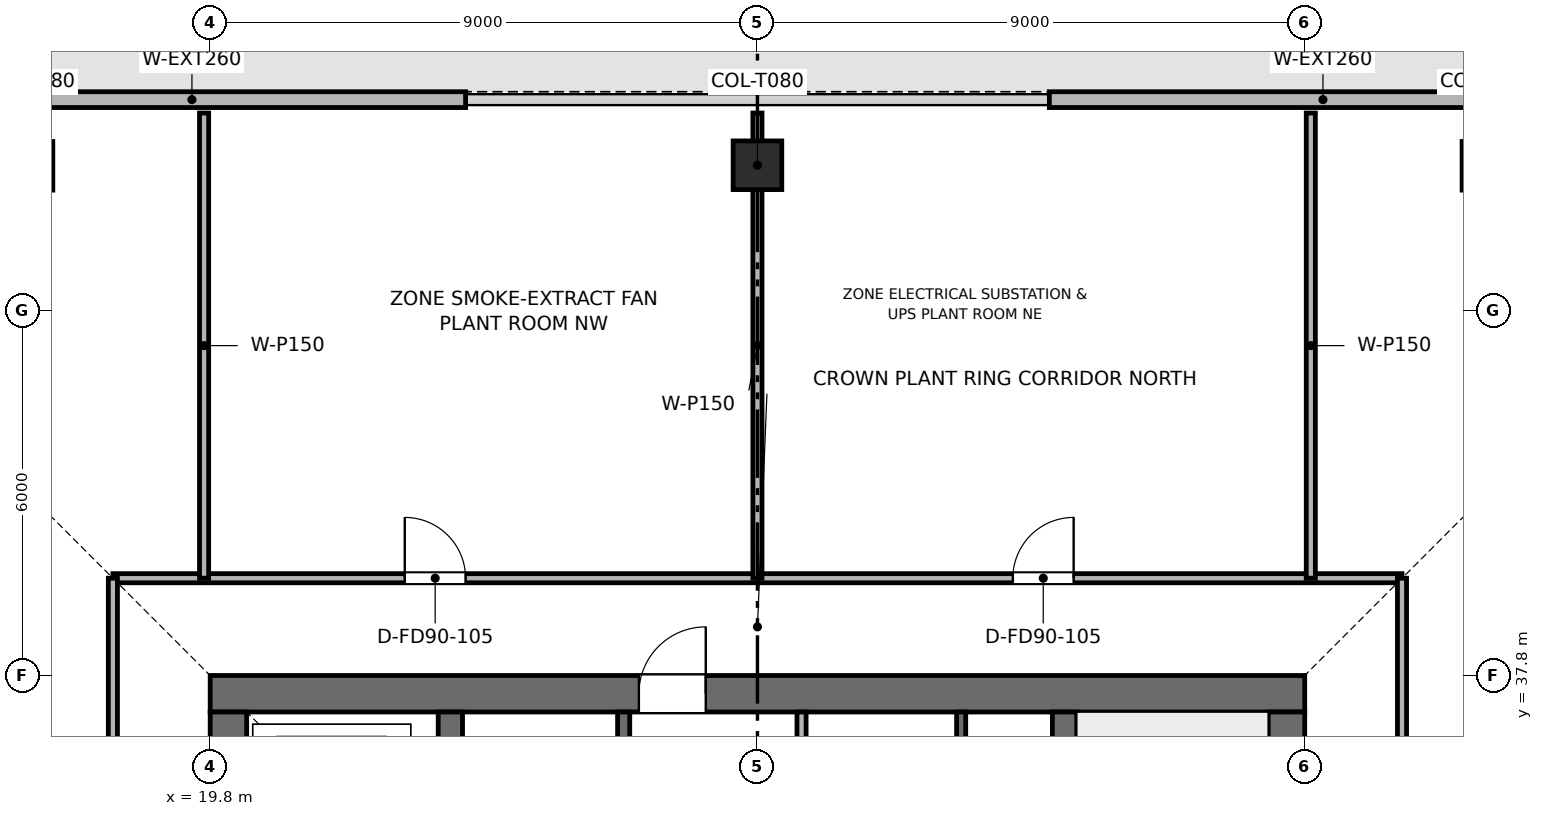
"""IFC4 building model, lengths in metres.
Left out: names, types, materials, properties, quantities, classifications, styles, units other than length and angle.
Written with IfcOpenShell. Run it as: python <this file> out.ifc"""

import sys

from ifc_helpers import new_model, si_unit, direction, frame, frame_2d, origin, origin_2d, place, context, subcontext, project, spatial, rectangle, extrude, element, fill, save


model = new_model("IFC4")
c1 = context("Model", 3, precision=1e-05, world=origin(), true_north=direction((0.0, 1.0)))
c2 = subcontext(c1, "Body", "Model", "MODEL_VIEW")
j1 = project(units=[si_unit("LENGTHUNIT", "METRE"), si_unit("PLANEANGLEUNIT", "RADIAN")], contexts=[c1])
p1 = place(None, origin())
s1 = spatial("IfcSite", under=j1, at=p1, CompositionType="ELEMENT")
p2 = place(p1, origin())
s2 = spatial("IfcBuilding", under=s1, at=p2, CompositionType="ELEMENT")
p3 = place(p2, frame((0.0, 0.0, 369.0)))
s3 = spatial("IfcBuildingStorey", under=s2, at=p3, CompositionType="ELEMENT", Elevation=369.0)
p4 = place(p3, frame((19.8, 37.5, 0.0), z_axis=(0.0, 0.0, 1.0), x_axis=(1.0, 0.0, 0.0)))
e1 = element("IfcWall", 1, at=p4, inside=s3, PredefinedType="SHEAR", context=c2, shape_type="SweptSolid", body=[
    extrude(rectangle(XDim=18.0, YDim=0.6, at=frame_2d((9.0, 0.0))), origin(), (0.0, 0.0, 1.0), 4.8),
])
p5 = place(p4, frame((7.05, 0.0, 0.0)))
e2 = element("IfcOpeningElement", 2, at=p5, cuts=e1, PredefinedType="OPENING", context=c2, shape_type="SweptSolid", body=[
    extrude(rectangle(XDim=1.1, YDim=2.15, at=frame_2d((0.55, 1.075))), frame((0.0, 0.31, 0.0), z_axis=(0.0, -1.0, 0.0), x_axis=(1.0, 0.0, 0.0)), (0.0, 0.0, 1.0), 0.62),
])
p6 = place(p3, frame((20.1, 20.4, 0.0), z_axis=(0.0, 0.0, 1.0), x_axis=(0.0, 1.0, 0.0)))
e3 = element("IfcWall", 3, at=p6, inside=s3, PredefinedType="SHEAR", context=c2, shape_type="SweptSolid", body=[
    extrude(rectangle(XDim=16.8, YDim=0.6, at=frame_2d((8.4, 0.0))), origin(), (0.0, 0.0, 1.0), 4.8),
])
p7 = place(p6, frame((10.4, 0.0, 0.0)))
e4 = element("IfcOpeningElement", 4, at=p7, cuts=e3, PredefinedType="OPENING", context=c2, shape_type="SweptSolid", body=[
    extrude(rectangle(XDim=1.1, YDim=2.15, at=frame_2d((0.55, 1.075))), frame((0.0, 0.31, 0.0), z_axis=(0.0, -1.0, 0.0), x_axis=(1.0, 0.0, 0.0)), (0.0, 0.0, 1.0), 0.62),
])
p8 = place(p3, frame((37.5, 20.4, 0.0), z_axis=(0.0, 0.0, 1.0), x_axis=(0.0, 1.0, 0.0)))
e5 = element("IfcWall", 5, at=p8, inside=s3, PredefinedType="SHEAR", context=c2, shape_type="SweptSolid", body=[
    extrude(rectangle(XDim=16.8, YDim=0.6, at=frame_2d((8.4, 0.0))), origin(), (0.0, 0.0, 1.0), 4.8),
])
p9 = place(p8, frame((4.9, 0.0, 0.0)))
e6 = element("IfcOpeningElement", 6, at=p9, cuts=e5, PredefinedType="OPENING", context=c2, shape_type="SweptSolid", body=[
    extrude(rectangle(XDim=1.1, YDim=2.15, at=frame_2d((0.55, 1.075))), frame((0.0, 0.31, 0.0), z_axis=(0.0, -1.0, 0.0), x_axis=(1.0, 0.0, 0.0)), (0.0, 0.0, 1.0), 0.62),
])
for number, where, z_axis, x_axis in (
    (7, (23.75, 20.4, 0.0), (0.0, 0.0, 1.0), (0.0, 1.0, 0.0)),
    (8, (33.85, 20.4, 0.0), (0.0, 0.0, 1.0), (0.0, 1.0, 0.0)),
):
    element("IfcWall", number, at=place(p3, frame(where, z_axis=z_axis, x_axis=x_axis)), inside=s3, PredefinedType="SHEAR", context=c2, shape_type="SweptSolid", body=[
        extrude(rectangle(XDim=16.8, YDim=0.4, at=frame_2d((8.4, 0.0))), origin(), (0.0, 0.0, 1.0), 4.8),
    ])
p10 = place(p3, frame((40.788, 46.182, 0.049), z_axis=(-0.228000086826, -0.341924783218, 0.911648727871), x_axis=(0.831993877934, -0.554784811509, 0.0)))
e9 = element("IfcColumn", 9, at=p10, inside=s3, PredefinedType="COLUMN", context=c2, shape_type="SweptSolid", body=[
    extrude(rectangle(XDim=0.8, YDim=0.8, at=origin_2d()), origin(), (0.0, 0.0, 1.0), 4.86),
])
p11 = place(p3, frame((28.8, 46.191, 0.025), z_axis=(0.0, -0.35111223817, 0.936333378774), x_axis=(1.0, 0.0, 0.0)))
e10 = element("IfcColumn", 10, at=p11, inside=s3, PredefinedType="COLUMN", context=c2, shape_type="SweptSolid", body=[
    extrude(rectangle(XDim=0.8, YDim=0.8, at=origin_2d()), origin(), (0.0, 0.0, 1.0), 4.776),
])
p12 = place(p3, frame((16.812, 46.182, 0.049), z_axis=(0.227952465889, -0.341928698833, 0.911659167787), x_axis=(0.832050294338, 0.554700196225, 0.0)))
e11 = element("IfcColumn", 11, at=p12, inside=s3, PredefinedType="COLUMN", context=c2, shape_type="SweptSolid", body=[
    extrude(rectangle(XDim=0.8, YDim=0.8, at=origin_2d()), origin(), (0.0, 0.0, 1.0), 4.86),
])
for number, where, z_axis, x_axis in (
    (12, (41.246, 41.246, 0.018), (-0.236, -0.236, 0.943), (0.707, -0.707, 0.0)),
    (13, (16.354, 41.246, 0.018), (0.236, -0.236, 0.943), (0.707, 0.707, 0.0)),
):
    element("IfcColumn", number, at=place(p3, frame(where, z_axis=z_axis, x_axis=x_axis)), inside=s3, PredefinedType="COLUMN", context=c2, shape_type="SweptSolid", body=[
        extrude(rectangle(XDim=0.8, YDim=0.8, at=origin_2d()), origin(), (0.0, 0.0, 1.0), 4.751),
    ])
for number, where, z_axis, x_axis in (
    (14, (15.0, 47.27, 0.0), (0.0, 0.0, 1.0), (1.0, 0.0, 0.0)),
    (15, (33.6, 47.27, 0.0), (0.0, 0.0, 1.0), (1.0, 0.0, 0.0)),
):
    element("IfcWall", number, at=place(p3, frame(where, z_axis=z_axis, x_axis=x_axis)), inside=s3, PredefinedType="SOLIDWALL", context=c2, shape_type="SweptSolid", body=[
        extrude(rectangle(XDim=9.0, YDim=0.26, at=frame_2d((4.5, 0.0))), origin(), (0.0, 0.0, 1.0), 4.5),
    ])
p13 = place(p3, frame((32.15, 34.0, 0.0), z_axis=(0.0, 0.0, 1.0), x_axis=(0.0, 1.0, 0.0)))
e16 = element("IfcWall", 16, at=p13, inside=s3, PredefinedType="SHEAR", context=c2, shape_type="SweptSolid", body=[
    extrude(rectangle(XDim=3.2, YDim=0.15, at=frame_2d((1.6, 0.0))), origin(), (0.0, 0.0, 1.0), 4.5),
])
p14 = place(p3, frame((26.6, 34.0, 0.0), z_axis=(0.0, 0.0, 1.0), x_axis=(0.0, 1.0, 0.0)))
e17 = element("IfcWall", 17, at=p14, inside=s3, PredefinedType="SHEAR", context=c2, shape_type="SweptSolid", body=[
    extrude(rectangle(XDim=3.2, YDim=0.2, at=frame_2d((1.6, 0.0))), origin(), (0.0, 0.0, 1.0), 4.5),
])
p15 = place(p14, frame((0.75, 0.0, 0.0)))
e18 = element("IfcOpeningElement", 18, at=p15, cuts=e17, PredefinedType="OPENING", context=c2, shape_type="SweptSolid", body=[
    extrude(rectangle(XDim=1.1, YDim=2.15, at=frame_2d((0.55, 1.075))), frame((0.0, 0.11, 0.0), z_axis=(0.0, -1.0, 0.0), x_axis=(1.0, 0.0, 0.0)), (0.0, 0.0, 1.0), 0.22),
])
p16 = place(p3, frame((29.525, 33.925, 0.0), z_axis=(0.0, 0.0, 1.0), x_axis=(0.0, 1.0, 0.0)))
e19 = element("IfcWall", 19, at=p16, inside=s3, PredefinedType="PARTITIONING", context=c2, shape_type="SweptSolid", body=[
    extrude(rectangle(XDim=3.275, YDim=0.15, at=frame_2d((1.637, 0.0))), origin(), (0.0, 0.0, 1.0), 4.5),
])
p17 = place(p16, frame((0.85, 0.0, 0.0)))
e20 = element("IfcOpeningElement", 20, at=p17, cuts=e19, PredefinedType="OPENING", context=c2, shape_type="SweptSolid", body=[
    extrude(rectangle(XDim=0.9, YDim=2.1, at=frame_2d((0.45, 1.05))), frame((0.0, 0.085, 0.0), z_axis=(0.0, -1.0, 0.0), x_axis=(1.0, 0.0, 0.0)), (0.0, 0.0, 1.0), 0.17),
])
p18 = place(p3, frame((18.2, 39.4, 0.0), z_axis=(0.0, 0.0, 1.0), x_axis=(1.0, 0.0, 0.0)))
e21 = element("IfcWall", 21, at=p18, inside=s3, PredefinedType="PARTITIONING", context=c2, shape_type="SweptSolid", body=[
    extrude(rectangle(XDim=21.2, YDim=0.15, at=frame_2d((10.6, 0.0))), origin(), (0.0, 0.0, 1.0), 4.085),
])
p19 = place(p18, frame((4.8, 0.0, 0.0)))
e22 = element("IfcOpeningElement", 22, at=p19, cuts=e21, PredefinedType="OPENING", context=c2, shape_type="SweptSolid", body=[
    extrude(rectangle(XDim=1.0, YDim=2.15, at=frame_2d((0.5, 1.075))), frame((0.0, 0.085, 0.0), z_axis=(0.0, -1.0, 0.0), x_axis=(1.0, 0.0, 0.0)), (0.0, 0.0, 1.0), 0.17),
])
p20 = place(p18, frame((14.8, 0.0, 0.0)))
e23 = element("IfcOpeningElement", 23, at=p20, cuts=e21, PredefinedType="OPENING", context=c2, shape_type="SweptSolid", body=[
    extrude(rectangle(XDim=1.0, YDim=2.15, at=frame_2d((0.5, 1.075))), frame((0.0, 0.085, 0.0), z_axis=(0.0, -1.0, 0.0), x_axis=(1.0, 0.0, 0.0)), (0.0, 0.0, 1.0), 0.17),
])
for number, where, z_axis, x_axis in (
    (24, (18.2, 18.2, 0.0), (0.0, 0.0, 1.0), (0.0, 1.0, 0.0)),
    (25, (39.4, 18.2, 0.0), (0.0, 0.0, 1.0), (0.0, 1.0, 0.0)),
):
    element("IfcWall", number, at=place(p3, frame(where, z_axis=z_axis, x_axis=x_axis)), inside=s3, PredefinedType="PARTITIONING", context=c2, shape_type="SweptSolid", body=[
        extrude(rectangle(XDim=21.2, YDim=0.15, at=frame_2d((10.6, 0.0))), origin(), (0.0, 0.0, 1.0), 4.085),
    ])
p21 = place(p3, frame((19.7, 39.4, 0.0), z_axis=(0.0, 0.0, 1.0), x_axis=(0.0, 1.0, 0.0)))
e26 = element("IfcWall", 26, at=p21, inside=s3, PredefinedType="PARTITIONING", context=c2, shape_type="SweptSolid", body=[
    extrude(rectangle(XDim=7.65, YDim=0.15, at=frame_2d((3.825, 0.0))), origin(), (0.0, 0.0, 1.0), 4.185),
])
p22 = place(p3, frame((28.8, 39.4, 0.0), z_axis=(0.0, 0.0, 1.0), x_axis=(0.0, 1.0, 0.0)))
e27 = element("IfcWall", 27, at=p22, inside=s3, PredefinedType="PARTITIONING", context=c2, shape_type="SweptSolid", body=[
    extrude(rectangle(XDim=7.65, YDim=0.15, at=frame_2d((3.825, 0.0))), origin(), (0.0, 0.0, 1.0), 4.085),
])
p23 = place(p3, frame((37.9, 39.4, 0.0), z_axis=(0.0, 0.0, 1.0), x_axis=(0.0, 1.0, 0.0)))
e28 = element("IfcWall", 28, at=p23, inside=s3, PredefinedType="PARTITIONING", context=c2, shape_type="SweptSolid", body=[
    extrude(rectangle(XDim=7.65, YDim=0.15, at=frame_2d((3.825, 0.0))), origin(), (0.0, 0.0, 1.0), 4.185),
])
p24 = place(p19, origin())
e29 = element("IfcDoor", 29, at=p24, inside=s3, OperationType="SINGLE_SWING_LEFT", PredefinedType="DOOR", context=c2, shape_type="SweptSolid", body=[
    extrude(rectangle(XDim=1.0, YDim=2.15, at=frame_2d((0.5, 1.075))), frame((0.0, 0.025, 0.0), z_axis=(0.0, -1.0, 0.0), x_axis=(1.0, 0.0, 0.0)), (0.0, 0.0, 1.0), 0.05),
])
fill(e22, e29)
p25 = place(p20, origin())
e30 = element("IfcDoor", 30, at=p25, inside=s3, OperationType="SINGLE_SWING_RIGHT", PredefinedType="DOOR", context=c2, shape_type="SweptSolid", body=[
    extrude(rectangle(XDim=1.0, YDim=2.15, at=frame_2d((0.5, 1.075))), frame((0.0, 0.025, 0.0), z_axis=(0.0, -1.0, 0.0), x_axis=(1.0, 0.0, 0.0)), (0.0, 0.0, 1.0), 0.05),
])
fill(e23, e30)
p26 = place(p5, origin())
e31 = element("IfcDoor", 31, at=p26, inside=s3, OperationType="SINGLE_SWING_RIGHT", PredefinedType="DOOR", context=c2, shape_type="SweptSolid", body=[
    extrude(rectangle(XDim=1.1, YDim=2.15, at=frame_2d((0.55, 1.075))), frame((0.0, 0.025, 0.0), z_axis=(0.0, -1.0, 0.0), x_axis=(1.0, 0.0, 0.0)), (0.0, 0.0, 1.0), 0.05),
])
fill(e2, e31)
save(model, sys.argv[1])
